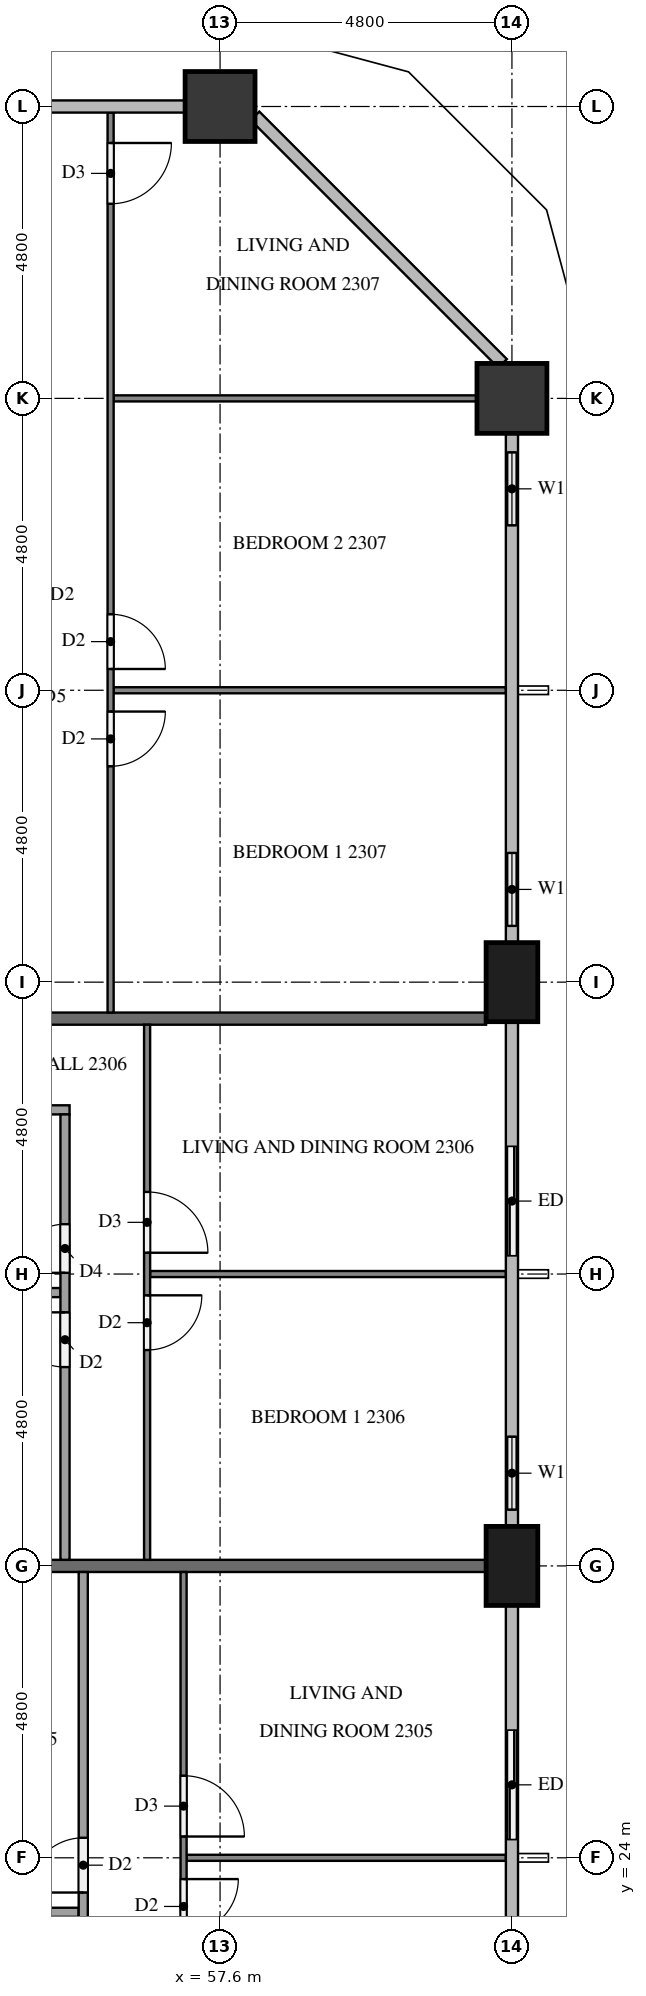
"""IFC4 building model, lengths in metres.
Left out: names, types, materials, properties, quantities, classifications, styles, units other than length and angle.
Written with IfcOpenShell. Run it as: python <this file> out.ifc"""

import sys

from ifc_helpers import new_model, si_unit, direction, frame, frame_2d, origin, origin_2d, place, context, subcontext, project, spatial, rectangle, extrude, element, fill, save


model = new_model("IFC4")
c1 = context("Model", 3, precision=1e-05, world=origin(), true_north=direction((0.0, 1.0)))
c2 = subcontext(c1, "Body", "Model", "MODEL_VIEW")
j1 = project(units=[si_unit("LENGTHUNIT", "METRE"), si_unit("PLANEANGLEUNIT", "RADIAN")], contexts=[c1])
p1 = place(None, origin())
s1 = spatial("IfcSite", under=j1, at=p1, CompositionType="ELEMENT")
p2 = place(p1, origin())
s2 = spatial("IfcBuilding", under=s1, at=p2, CompositionType="ELEMENT")
p3 = place(p2, frame((0.0, 0.0, 92.7)))
s3 = spatial("IfcBuildingStorey", under=s2, at=p3, CompositionType="ELEMENT", Elevation=92.7)
for number, where, z_axis, x_axis in (
    (1, (62.4, 28.8, 0.0), (0.0, 0.0, 1.0), (0.0, 1.0, 0.0)),
    (2, (62.4, 38.4, 0.0), (0.0, 0.0, 1.0), (0.0, 1.0, 0.0)),
):
    element("IfcColumn", number, at=place(p3, frame(where, z_axis=z_axis, x_axis=x_axis)), inside=s3, PredefinedType="COLUMN", context=c2, shape_type="SweptSolid", body=[
        extrude(rectangle(XDim=1.3, YDim=0.85, at=origin_2d()), origin(), (0.0, 0.0, 1.0), 3.2),
    ])
for number, where, z_axis, x_axis in (
    (3, (62.4, 48.0, 0.0), (0.0, 0.0, 1.0), (1.0, 0.0, 0.0)),
    (4, (57.6, 52.8, 0.0), (0.0, 0.0, 1.0), (1.0, 0.0, 0.0)),
):
    element("IfcColumn", number, at=place(p3, frame(where, z_axis=z_axis, x_axis=x_axis)), inside=s3, PredefinedType="COLUMN", context=c2, shape_type="SweptSolid", body=[
        extrude(rectangle(XDim=1.15, YDim=1.15, at=origin_2d()), origin(), (0.0, 0.0, 1.0), 3.2),
    ])
p4 = place(p3, frame((62.4, 24.0, 0.0), z_axis=(0.0, 0.0, 1.0), x_axis=(0.0, 1.0, 0.0)))
e5 = element("IfcWall", 5, at=p4, inside=s3, PredefinedType="SOLIDWALL", context=c2, shape_type="SweptSolid", body=[
    extrude(rectangle(XDim=2.4, YDim=0.15, at=frame_2d((1.2, 0.0))), origin(), (0.0, 0.0, 1.0), 3.2),
])
p5 = place(p4, frame((0.3, 0.0, 0.0)))
e6 = element("IfcOpeningElement", 6, at=p5, cuts=e5, PredefinedType="OPENING", context=c2, shape_type="SweptSolid", body=[
    extrude(rectangle(XDim=1.8, YDim=2.4, at=frame_2d((0.9, 1.2))), frame((0.0, 0.085, 0.0), z_axis=(0.0, -1.0, 0.0), x_axis=(1.0, 0.0, 0.0)), (0.0, 0.0, 1.0), 0.17),
])
p6 = place(p3, frame((62.4, 29.45, 0.0), z_axis=(0.0, 0.0, 1.0), x_axis=(0.0, 1.0, 0.0)))
e7 = element("IfcWall", 7, at=p6, inside=s3, PredefinedType="SOLIDWALL", context=c2, shape_type="SweptSolid", body=[
    extrude(rectangle(XDim=1.75, YDim=0.15, at=frame_2d((0.875, 0.0))), origin(), (0.0, 0.0, 1.0), 3.2),
])
p7 = place(p6, frame((0.275, 0.0, 0.9)))
e8 = element("IfcOpeningElement", 8, at=p7, cuts=e7, PredefinedType="OPENING", context=c2, shape_type="SweptSolid", body=[
    extrude(rectangle(XDim=1.2, YDim=1.4, at=frame_2d((0.6, 0.7))), frame((0.0, 0.085, 0.0), z_axis=(0.0, -1.0, 0.0), x_axis=(1.0, 0.0, 0.0)), (0.0, 0.0, 1.0), 0.17),
])
p8 = place(p3, frame((62.4, 33.6, 0.0), z_axis=(0.0, 0.0, 1.0), x_axis=(0.0, 1.0, 0.0)))
e9 = element("IfcWall", 9, at=p8, inside=s3, PredefinedType="SOLIDWALL", context=c2, shape_type="SweptSolid", body=[
    extrude(rectangle(XDim=2.4, YDim=0.15, at=frame_2d((1.2, 0.0))), origin(), (0.0, 0.0, 1.0), 3.2),
])
p9 = place(p8, frame((0.3, 0.0, 0.0)))
e10 = element("IfcOpeningElement", 10, at=p9, cuts=e9, PredefinedType="OPENING", context=c2, shape_type="SweptSolid", body=[
    extrude(rectangle(XDim=1.8, YDim=2.4, at=frame_2d((0.9, 1.2))), frame((0.0, 0.085, 0.0), z_axis=(0.0, -1.0, 0.0), x_axis=(1.0, 0.0, 0.0)), (0.0, 0.0, 1.0), 0.17),
])
p10 = place(p3, frame((62.4, 39.05, 0.0), z_axis=(0.0, 0.0, 1.0), x_axis=(0.0, 1.0, 0.0)))
e11 = element("IfcWall", 11, at=p10, inside=s3, PredefinedType="SOLIDWALL", context=c2, shape_type="SweptSolid", body=[
    extrude(rectangle(XDim=1.75, YDim=0.15, at=frame_2d((0.875, 0.0))), origin(), (0.0, 0.0, 1.0), 3.2),
])
p11 = place(p10, frame((0.275, 0.0, 0.9)))
e12 = element("IfcOpeningElement", 12, at=p11, cuts=e11, PredefinedType="OPENING", context=c2, shape_type="SweptSolid", body=[
    extrude(rectangle(XDim=1.2, YDim=1.4, at=frame_2d((0.6, 0.7))), frame((0.0, 0.085, 0.0), z_axis=(0.0, -1.0, 0.0), x_axis=(1.0, 0.0, 0.0)), (0.0, 0.0, 1.0), 0.17),
])
p12 = place(p3, frame((62.4, 45.6, 0.0), z_axis=(0.0, 0.0, 1.0), x_axis=(0.0, 1.0, 0.0)))
e13 = element("IfcWall", 13, at=p12, inside=s3, PredefinedType="SOLIDWALL", context=c2, shape_type="SweptSolid", body=[
    extrude(rectangle(XDim=1.825, YDim=0.15, at=frame_2d((0.913, 0.0))), origin(), (0.0, 0.0, 1.0), 3.2),
])
p13 = place(p12, frame((0.312, 0.0, 0.9)))
e14 = element("IfcOpeningElement", 14, at=p13, cuts=e13, PredefinedType="OPENING", context=c2, shape_type="SweptSolid", body=[
    extrude(rectangle(XDim=1.2, YDim=1.4, at=frame_2d((0.6, 0.7))), frame((0.0, 0.085, 0.0), z_axis=(0.0, -1.0, 0.0), x_axis=(1.0, 0.0, 0.0)), (0.0, 0.0, 1.0), 0.17),
])
for number, where, z_axis, x_axis in (
    (15, (52.5, 28.8, 0.0), (0.0, 0.0, 1.0), (1.0, 0.0, 0.0)),
    (16, (52.5, 37.8, 0.0), (0.0, 0.0, 1.0), (1.0, 0.0, 0.0)),
):
    element("IfcWall", number, at=place(p3, frame(where, z_axis=z_axis, x_axis=x_axis)), inside=s3, PredefinedType="PARTITIONING", context=c2, shape_type="SweptSolid", body=[
        extrude(rectangle(XDim=9.475, YDim=0.2, at=frame_2d((4.738, 0.0))), origin(), (0.0, 0.0, 1.0), 3.2),
    ])
p14 = place(p3, frame((57.05, 24.0, 0.0), z_axis=(0.0, 0.0, 1.0), x_axis=(1.0, 0.0, 0.0)))
e17 = element("IfcWall", 17, at=p14, inside=s3, PredefinedType="PARTITIONING", context=c2, shape_type="SweptSolid", body=[
    extrude(rectangle(XDim=5.25, YDim=0.1, at=frame_2d((2.625, 0.0))), origin(), (0.0, 0.0, 1.0), 3.2),
])
p15 = place(p3, frame((57.0, 28.7, 0.0), z_axis=(0.0, 0.0, 1.0), x_axis=(0.0, -1.0, 0.0)))
e18 = element("IfcWall", 18, at=p15, inside=s3, PredefinedType="PARTITIONING", context=c2, shape_type="SweptSolid", body=[
    extrude(rectangle(XDim=13.6, YDim=0.1, at=frame_2d((6.8, 0.0))), origin(), (0.0, 0.0, 1.0), 3.2),
])
p16 = place(p15, frame((12.4, 0.0, 0.0)))
e19 = element("IfcOpeningElement", 19, at=p16, cuts=e18, PredefinedType="OPENING", context=c2, shape_type="SweptSolid", body=[
    extrude(rectangle(XDim=0.9, YDim=2.1, at=frame_2d((0.45, 1.05))), frame((0.0, 0.06, 0.0), z_axis=(0.0, -1.0, 0.0), x_axis=(1.0, 0.0, 0.0)), (0.0, 0.0, 1.0), 0.12),
])
p17 = place(p15, frame((5.05, 0.0, 0.0)))
e20 = element("IfcOpeningElement", 20, at=p17, cuts=e18, PredefinedType="OPENING", context=c2, shape_type="SweptSolid", body=[
    extrude(rectangle(XDim=0.9, YDim=2.1, at=frame_2d((0.45, 1.05))), frame((0.0, 0.06, 0.0), z_axis=(0.0, -1.0, 0.0), x_axis=(1.0, 0.0, 0.0)), (0.0, 0.0, 1.0), 0.12),
])
p18 = place(p15, frame((3.35, 0.0, 0.0)))
e21 = element("IfcOpeningElement", 21, at=p18, cuts=e18, PredefinedType="OPENING", context=c2, shape_type="SweptSolid", body=[
    extrude(rectangle(XDim=1.0, YDim=2.1, at=frame_2d((0.5, 1.05))), frame((0.0, 0.06, 0.0), z_axis=(0.0, -1.0, 0.0), x_axis=(1.0, 0.0, 0.0)), (0.0, 0.0, 1.0), 0.12),
])
p19 = place(p3, frame((52.5, 23.104, 0.0), z_axis=(0.0, 0.0, 1.0), x_axis=(1.0, 0.0, 0.0)))
e22 = element("IfcWall", 22, at=p19, inside=s3, PredefinedType="PARTITIONING", context=c2, shape_type="SweptSolid", body=[
    extrude(rectangle(XDim=2.775, YDim=0.15, at=frame_2d((1.387, 0.0))), origin(), (0.0, 0.0, 1.0), 3.2),
])
p20 = place(p3, frame((55.35, 16.575, 0.0), z_axis=(0.0, 0.0, 1.0), x_axis=(0.0, 1.0, 0.0)))
e23 = element("IfcWall", 23, at=p20, inside=s3, PredefinedType="PARTITIONING", context=c2, shape_type="SweptSolid", body=[
    extrude(rectangle(XDim=12.125, YDim=0.15, at=frame_2d((6.062, 0.0))), origin(), (0.0, 0.0, 1.0), 3.2),
])
p21 = place(p20, frame((0.3, 0.0, 0.0)))
e24 = element("IfcOpeningElement", 24, at=p21, cuts=e23, PredefinedType="OPENING", context=c2, shape_type="SweptSolid", body=[
    extrude(rectangle(XDim=0.8, YDim=2.1, at=frame_2d((0.4, 1.05))), frame((0.0, 0.085, 0.0), z_axis=(0.0, -1.0, 0.0), x_axis=(1.0, 0.0, 0.0)), (0.0, 0.0, 1.0), 0.17),
])
p22 = place(p20, frame((5.404, 0.0, 0.0)))
e25 = element("IfcOpeningElement", 25, at=p22, cuts=e23, PredefinedType="OPENING", context=c2, shape_type="SweptSolid", body=[
    extrude(rectangle(XDim=0.8, YDim=2.1, at=frame_2d((0.4, 1.05))), frame((0.0, 0.085, 0.0), z_axis=(0.0, -1.0, 0.0), x_axis=(1.0, 0.0, 0.0)), (0.0, 0.0, 1.0), 0.17),
])
p23 = place(p20, frame((6.854, 0.0, 0.0)))
e26 = element("IfcOpeningElement", 26, at=p23, cuts=e23, PredefinedType="OPENING", context=c2, shape_type="SweptSolid", body=[
    extrude(rectangle(XDim=0.9, YDim=2.1, at=frame_2d((0.45, 1.05))), frame((0.0, 0.085, 0.0), z_axis=(0.0, -1.0, 0.0), x_axis=(1.0, 0.0, 0.0)), (0.0, 0.0, 1.0), 0.17),
])
p24 = place(p3, frame((56.45, 33.6, 0.0), z_axis=(0.0, 0.0, 1.0), x_axis=(1.0, 0.0, 0.0)))
e27 = element("IfcWall", 27, at=p24, inside=s3, PredefinedType="PARTITIONING", context=c2, shape_type="SweptSolid", body=[
    extrude(rectangle(XDim=5.85, YDim=0.1, at=frame_2d((2.925, 0.0))), origin(), (0.0, 0.0, 1.0), 3.2),
])
p25 = place(p3, frame((56.4, 37.7, 0.0), z_axis=(0.0, 0.0, 1.0), x_axis=(0.0, -1.0, 0.0)))
e28 = element("IfcWall", 28, at=p25, inside=s3, PredefinedType="PARTITIONING", context=c2, shape_type="SweptSolid", body=[
    extrude(rectangle(XDim=8.8, YDim=0.1, at=frame_2d((4.4, 0.0))), origin(), (0.0, 0.0, 1.0), 3.2),
])
p26 = place(p25, frame((2.75, 0.0, 0.0)))
e29 = element("IfcOpeningElement", 29, at=p26, cuts=e28, PredefinedType="OPENING", context=c2, shape_type="SweptSolid", body=[
    extrude(rectangle(XDim=1.0, YDim=2.1, at=frame_2d((0.5, 1.05))), frame((0.0, 0.06, 0.0), z_axis=(0.0, -1.0, 0.0), x_axis=(1.0, 0.0, 0.0)), (0.0, 0.0, 1.0), 0.12),
])
p27 = place(p25, frame((4.45, 0.0, 0.0)))
e30 = element("IfcOpeningElement", 30, at=p27, cuts=e28, PredefinedType="OPENING", context=c2, shape_type="SweptSolid", body=[
    extrude(rectangle(XDim=0.9, YDim=2.1, at=frame_2d((0.45, 1.05))), frame((0.0, 0.06, 0.0), z_axis=(0.0, -1.0, 0.0), x_axis=(1.0, 0.0, 0.0)), (0.0, 0.0, 1.0), 0.12),
])
p28 = place(p3, frame((52.5, 33.295, 0.0), z_axis=(0.0, 0.0, 1.0), x_axis=(1.0, 0.0, 0.0)))
e31 = element("IfcWall", 31, at=p28, inside=s3, PredefinedType="PARTITIONING", context=c2, shape_type="SweptSolid", body=[
    extrude(rectangle(XDim=2.475, YDim=0.15, at=frame_2d((1.238, 0.0))), origin(), (0.0, 0.0, 1.0), 3.2),
])
p29 = place(p3, frame((52.5, 36.3, 0.0), z_axis=(0.0, 0.0, 1.0), x_axis=(1.0, 0.0, 0.0)))
e32 = element("IfcWall", 32, at=p29, inside=s3, PredefinedType="PARTITIONING", context=c2, shape_type="SweptSolid", body=[
    extrude(rectangle(XDim=2.625, YDim=0.15, at=frame_2d((1.312, 0.0))), origin(), (0.0, 0.0, 1.0), 3.2),
])
p30 = place(p3, frame((55.05, 28.9, 0.0), z_axis=(0.0, 0.0, 1.0), x_axis=(0.0, 1.0, 0.0)))
e33 = element("IfcWall", 33, at=p30, inside=s3, PredefinedType="PARTITIONING", context=c2, shape_type="SweptSolid", body=[
    extrude(rectangle(XDim=7.325, YDim=0.15, at=frame_2d((3.663, 0.0))), origin(), (0.0, 0.0, 1.0), 3.2),
])
p31 = place(p30, frame((4.72, 0.0, 0.0)))
e34 = element("IfcOpeningElement", 34, at=p31, cuts=e33, PredefinedType="OPENING", context=c2, shape_type="SweptSolid", body=[
    extrude(rectangle(XDim=0.8, YDim=2.1, at=frame_2d((0.4, 1.05))), frame((0.0, 0.085, 0.0), z_axis=(0.0, -1.0, 0.0), x_axis=(1.0, 0.0, 0.0)), (0.0, 0.0, 1.0), 0.17),
])
p32 = place(p30, frame((3.17, 0.0, 0.0)))
e35 = element("IfcOpeningElement", 35, at=p32, cuts=e33, PredefinedType="OPENING", context=c2, shape_type="SweptSolid", body=[
    extrude(rectangle(XDim=0.9, YDim=2.1, at=frame_2d((0.45, 1.05))), frame((0.0, 0.085, 0.0), z_axis=(0.0, -1.0, 0.0), x_axis=(1.0, 0.0, 0.0)), (0.0, 0.0, 1.0), 0.17),
])
p33 = place(p3, frame((55.85, 43.2, 0.0), z_axis=(0.0, 0.0, 1.0), x_axis=(1.0, 0.0, 0.0)))
e36 = element("IfcWall", 36, at=p33, inside=s3, PredefinedType="PARTITIONING", context=c2, shape_type="SweptSolid", body=[
    extrude(rectangle(XDim=6.45, YDim=0.1, at=frame_2d((3.225, 0.0))), origin(), (0.0, 0.0, 1.0), 3.2),
])
p34 = place(p3, frame((55.85, 48.0, 0.0), z_axis=(0.0, 0.0, 1.0), x_axis=(1.0, 0.0, 0.0)))
e37 = element("IfcWall", 37, at=p34, inside=s3, PredefinedType="PARTITIONING", context=c2, shape_type="SweptSolid", body=[
    extrude(rectangle(XDim=5.975, YDim=0.1, at=frame_2d((2.987, 0.0))), origin(), (0.0, 0.0, 1.0), 3.2),
])
p35 = place(p3, frame((55.8, 52.7, 0.0), z_axis=(0.0, 0.0, 1.0), x_axis=(0.0, -1.0, 0.0)))
e38 = element("IfcWall", 38, at=p35, inside=s3, PredefinedType="PARTITIONING", context=c2, shape_type="SweptSolid", body=[
    extrude(rectangle(XDim=14.8, YDim=0.1, at=frame_2d((7.4, 0.0))), origin(), (0.0, 0.0, 1.0), 3.2),
])
p36 = place(p35, frame((9.85, 0.0, 0.0)))
e39 = element("IfcOpeningElement", 39, at=p36, cuts=e38, PredefinedType="OPENING", context=c2, shape_type="SweptSolid", body=[
    extrude(rectangle(XDim=0.9, YDim=2.1, at=frame_2d((0.45, 1.05))), frame((0.0, 0.06, 0.0), z_axis=(0.0, -1.0, 0.0), x_axis=(1.0, 0.0, 0.0)), (0.0, 0.0, 1.0), 0.12),
])
p37 = place(p35, frame((8.25, 0.0, 0.0)))
e40 = element("IfcOpeningElement", 40, at=p37, cuts=e38, PredefinedType="OPENING", context=c2, shape_type="SweptSolid", body=[
    extrude(rectangle(XDim=0.9, YDim=2.1, at=frame_2d((0.45, 1.05))), frame((0.0, 0.06, 0.0), z_axis=(0.0, -1.0, 0.0), x_axis=(1.0, 0.0, 0.0)), (0.0, 0.0, 1.0), 0.12),
])
p38 = place(p35, frame((0.5, 0.0, 0.0)))
e41 = element("IfcOpeningElement", 41, at=p38, cuts=e38, PredefinedType="OPENING", context=c2, shape_type="SweptSolid", body=[
    extrude(rectangle(XDim=1.0, YDim=2.1, at=frame_2d((0.5, 1.05))), frame((0.0, 0.06, 0.0), z_axis=(0.0, -1.0, 0.0), x_axis=(1.0, 0.0, 0.0)), (0.0, 0.0, 1.0), 0.12),
])
p39 = place(p5, origin())
e42 = element("IfcDoor", 42, at=p39, inside=s3, OperationType="SLIDING_TO_RIGHT", PredefinedType="DOOR", context=c2, shape_type="SweptSolid", body=[
    extrude(rectangle(XDim=1.8, YDim=2.4, at=frame_2d((0.9, 1.2))), frame((0.0, 0.025, 0.0), z_axis=(0.0, -1.0, 0.0), x_axis=(1.0, 0.0, 0.0)), (0.0, 0.0, 1.0), 0.05),
])
fill(e6, e42)
p40 = place(p7, origin())
e43 = element("IfcWindow", 43, at=p40, inside=s3, PartitioningType="SINGLE_PANEL", PredefinedType="WINDOW", context=c2, shape_type="SweptSolid", body=[
    extrude(rectangle(XDim=1.2, YDim=1.4, at=frame_2d((0.6, 0.7))), frame((0.0, 0.03, 0.0), z_axis=(0.0, -1.0, 0.0), x_axis=(1.0, 0.0, 0.0)), (0.0, 0.0, 1.0), 0.06),
])
fill(e8, e43)
p41 = place(p9, origin())
e44 = element("IfcDoor", 44, at=p41, inside=s3, OperationType="SLIDING_TO_LEFT", PredefinedType="DOOR", context=c2, shape_type="SweptSolid", body=[
    extrude(rectangle(XDim=1.8, YDim=2.4, at=frame_2d((0.9, 1.2))), frame((0.0, 0.025, 0.0), z_axis=(0.0, -1.0, 0.0), x_axis=(1.0, 0.0, 0.0)), (0.0, 0.0, 1.0), 0.05),
])
fill(e10, e44)
p42 = place(p11, origin())
e45 = element("IfcWindow", 45, at=p42, inside=s3, PartitioningType="SINGLE_PANEL", PredefinedType="WINDOW", context=c2, shape_type="SweptSolid", body=[
    extrude(rectangle(XDim=1.2, YDim=1.4, at=frame_2d((0.6, 0.7))), frame((0.0, 0.03, 0.0), z_axis=(0.0, -1.0, 0.0), x_axis=(1.0, 0.0, 0.0)), (0.0, 0.0, 1.0), 0.06),
])
fill(e12, e45)
p43 = place(p13, origin())
e46 = element("IfcWindow", 46, at=p43, inside=s3, PartitioningType="SINGLE_PANEL", PredefinedType="WINDOW", context=c2, shape_type="SweptSolid", body=[
    extrude(rectangle(XDim=1.2, YDim=1.4, at=frame_2d((0.6, 0.7))), frame((0.0, 0.03, 0.0), z_axis=(0.0, -1.0, 0.0), x_axis=(1.0, 0.0, 0.0)), (0.0, 0.0, 1.0), 0.06),
])
fill(e14, e46)
p44 = place(p17, origin())
e47 = element("IfcDoor", 47, at=p44, inside=s3, OperationType="SINGLE_SWING_LEFT", PredefinedType="DOOR", context=c2, shape_type="SweptSolid", body=[
    extrude(rectangle(XDim=0.9, YDim=2.1, at=frame_2d((0.45, 1.05))), frame((0.0, 0.025, 0.0), z_axis=(0.0, -1.0, 0.0), x_axis=(1.0, 0.0, 0.0)), (0.0, 0.0, 1.0), 0.05),
])
fill(e20, e47)
p45 = place(p18, origin())
e48 = element("IfcDoor", 48, at=p45, inside=s3, OperationType="SINGLE_SWING_RIGHT", PredefinedType="DOOR", context=c2, shape_type="SweptSolid", body=[
    extrude(rectangle(XDim=1.0, YDim=2.1, at=frame_2d((0.5, 1.05))), frame((0.0, 0.025, 0.0), z_axis=(0.0, -1.0, 0.0), x_axis=(1.0, 0.0, 0.0)), (0.0, 0.0, 1.0), 0.05),
])
fill(e21, e48)
p46 = place(p23, origin())
e49 = element("IfcDoor", 49, at=p46, inside=s3, OperationType="SINGLE_SWING_LEFT", PredefinedType="DOOR", context=c2, shape_type="SweptSolid", body=[
    extrude(rectangle(XDim=0.9, YDim=2.1, at=frame_2d((0.45, 1.05))), frame((0.0, 0.025, 0.0), z_axis=(0.0, -1.0, 0.0), x_axis=(1.0, 0.0, 0.0)), (0.0, 0.0, 1.0), 0.05),
])
fill(e26, e49)
p47 = place(p26, origin())
e50 = element("IfcDoor", 50, at=p47, inside=s3, OperationType="SINGLE_SWING_RIGHT", PredefinedType="DOOR", context=c2, shape_type="SweptSolid", body=[
    extrude(rectangle(XDim=1.0, YDim=2.1, at=frame_2d((0.5, 1.05))), frame((0.0, 0.025, 0.0), z_axis=(0.0, -1.0, 0.0), x_axis=(1.0, 0.0, 0.0)), (0.0, 0.0, 1.0), 0.05),
])
fill(e29, e50)
p48 = place(p27, origin())
e51 = element("IfcDoor", 51, at=p48, inside=s3, OperationType="SINGLE_SWING_LEFT", PredefinedType="DOOR", context=c2, shape_type="SweptSolid", body=[
    extrude(rectangle(XDim=0.9, YDim=2.1, at=frame_2d((0.45, 1.05))), frame((0.0, 0.025, 0.0), z_axis=(0.0, -1.0, 0.0), x_axis=(1.0, 0.0, 0.0)), (0.0, 0.0, 1.0), 0.05),
])
fill(e30, e51)
p49 = place(p31, origin())
e52 = element("IfcDoor", 52, at=p49, inside=s3, OperationType="SINGLE_SWING_LEFT", PredefinedType="DOOR", context=c2, shape_type="SweptSolid", body=[
    extrude(rectangle(XDim=0.8, YDim=2.1, at=frame_2d((0.4, 1.05))), frame((0.0, 0.025, 0.0), z_axis=(0.0, -1.0, 0.0), x_axis=(1.0, 0.0, 0.0)), (0.0, 0.0, 1.0), 0.05),
])
fill(e34, e52)
p50 = place(p32, origin())
e53 = element("IfcDoor", 53, at=p50, inside=s3, OperationType="SINGLE_SWING_RIGHT", PredefinedType="DOOR", context=c2, shape_type="SweptSolid", body=[
    extrude(rectangle(XDim=0.9, YDim=2.1, at=frame_2d((0.45, 1.05))), frame((0.0, 0.025, 0.0), z_axis=(0.0, -1.0, 0.0), x_axis=(1.0, 0.0, 0.0)), (0.0, 0.0, 1.0), 0.05),
])
fill(e35, e53)
p51 = place(p36, origin())
e54 = element("IfcDoor", 54, at=p51, inside=s3, OperationType="SINGLE_SWING_LEFT", PredefinedType="DOOR", context=c2, shape_type="SweptSolid", body=[
    extrude(rectangle(XDim=0.9, YDim=2.1, at=frame_2d((0.45, 1.05))), frame((0.0, 0.025, 0.0), z_axis=(0.0, -1.0, 0.0), x_axis=(1.0, 0.0, 0.0)), (0.0, 0.0, 1.0), 0.05),
])
fill(e39, e54)
p52 = place(p37, origin())
e55 = element("IfcDoor", 55, at=p52, inside=s3, OperationType="SINGLE_SWING_RIGHT", PredefinedType="DOOR", context=c2, shape_type="SweptSolid", body=[
    extrude(rectangle(XDim=0.9, YDim=2.1, at=frame_2d((0.45, 1.05))), frame((0.0, 0.025, 0.0), z_axis=(0.0, -1.0, 0.0), x_axis=(1.0, 0.0, 0.0)), (0.0, 0.0, 1.0), 0.05),
])
fill(e40, e55)
p53 = place(p38, origin())
e56 = element("IfcDoor", 56, at=p53, inside=s3, OperationType="SINGLE_SWING_LEFT", PredefinedType="DOOR", context=c2, shape_type="SweptSolid", body=[
    extrude(rectangle(XDim=1.0, YDim=2.1, at=frame_2d((0.5, 1.05))), frame((0.0, 0.025, 0.0), z_axis=(0.0, -1.0, 0.0), x_axis=(1.0, 0.0, 0.0)), (0.0, 0.0, 1.0), 0.05),
])
fill(e41, e56)
save(model, sys.argv[1])
